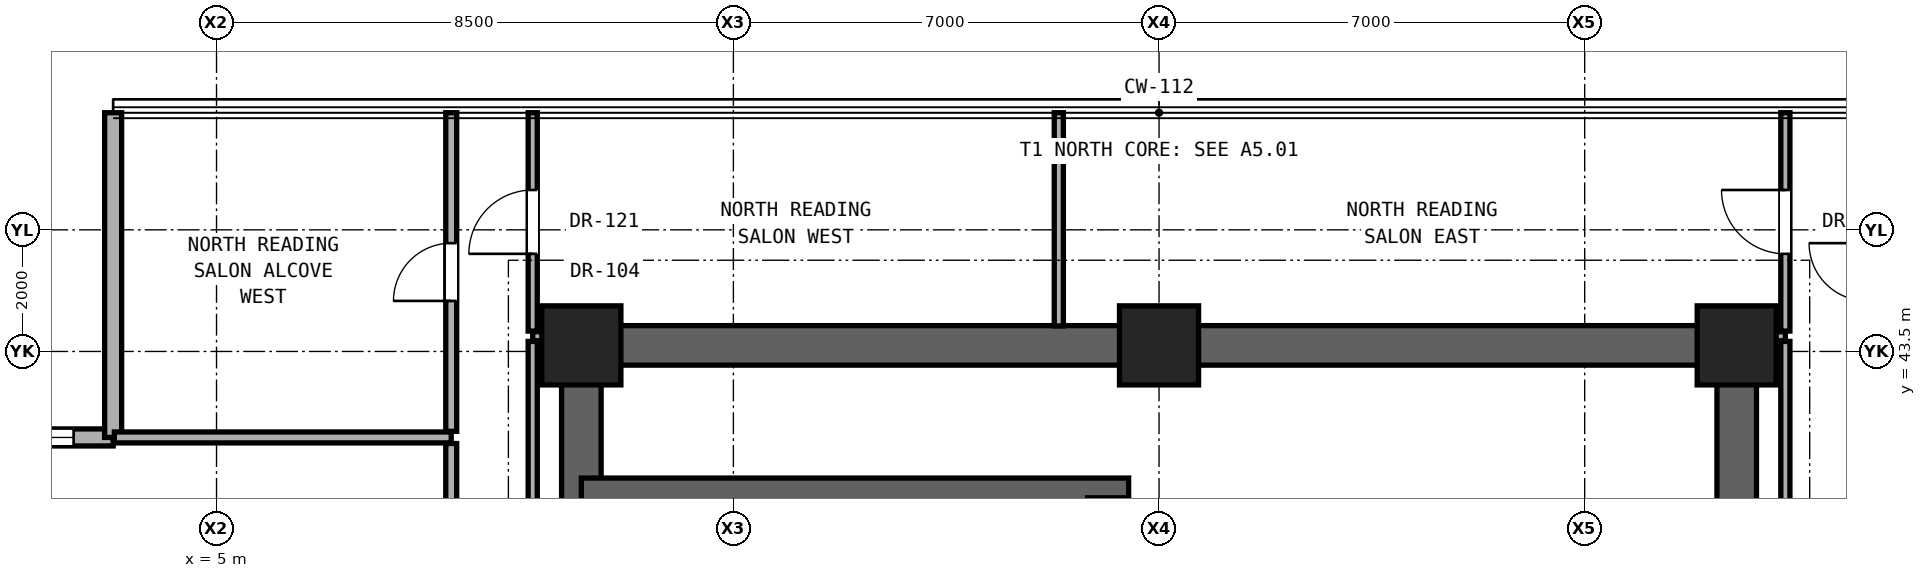
"""IFC4 building model, lengths in metres.
Left out: names, types, materials, properties, quantities, classifications, styles, units other than length and angle.
Written with IfcOpenShell. Run it as: python <this file> out.ifc"""

import sys

from ifc_helpers import new_model, si_unit, direction, frame, frame_2d, origin, origin_2d, place, context, subcontext, project, spatial, rectangle, extrude, element, fill, save


model = new_model("IFC4")
c1 = context("Model", 3, precision=1e-05, world=origin(), true_north=direction((0.0, 1.0)))
c2 = subcontext(c1, "Body", "Model", "MODEL_VIEW")
j1 = project(units=[si_unit("LENGTHUNIT", "METRE"), si_unit("PLANEANGLEUNIT", "RADIAN")], contexts=[c1])
p1 = place(None, origin())
s1 = spatial("IfcSite", under=j1, at=p1, CompositionType="ELEMENT")
p2 = place(p1, origin())
s2 = spatial("IfcBuilding", under=s1, at=p2, CompositionType="ELEMENT")
p3 = place(p2, frame((0.0, 0.0, 75.2)))
s3 = spatial("IfcBuildingStorey", under=s2, at=p3, CompositionType="ELEMENT", Elevation=75.2)
for number, where, z_axis, x_axis in (
    (1, (11.0, 43.6, 0.0), (0.0, 0.0, 1.0), (1.0, 0.0, 0.0)),
    (2, (20.5, 43.6, 0.0), (0.0, 0.0, 1.0), (1.0, 0.0, 0.0)),
    (3, (30.0, 43.6, 0.0), (0.0, 0.0, 1.0), (1.0, 0.0, 0.0)),
):
    element("IfcColumn", number, at=place(p3, frame(where, z_axis=z_axis, x_axis=x_axis)), inside=s3, PredefinedType="COLUMN", context=c2, shape_type="SweptSolid", body=[
        extrude(rectangle(XDim=1.3, YDim=1.3, at=origin_2d()), origin(), (0.0, 0.0, 1.0), 3.3),
    ])
p4 = place(p3, frame((11.0, 43.6, 0.0), z_axis=(0.0, 0.0, 1.0), x_axis=(1.0, 0.0, 0.0)))
e4 = element("IfcWall", 4, at=p4, inside=s3, PredefinedType="SHEAR", context=c2, shape_type="SweptSolid", body=[
    extrude(rectangle(XDim=19.0, YDim=0.65, at=frame_2d((9.5, 0.0))), origin(), (0.0, 0.0, 1.0), 3.06),
])
for number, where, z_axis, x_axis in (
    (5, (11.0, 37.6, 0.0), (0.0, 0.0, 1.0), (0.0, 1.0, 0.0)),
    (6, (30.0, 37.6, 0.0), (0.0, 0.0, 1.0), (0.0, 1.0, 0.0)),
):
    element("IfcWall", number, at=place(p3, frame(where, z_axis=z_axis, x_axis=x_axis)), inside=s3, PredefinedType="SHEAR", context=c2, shape_type="SweptSolid", body=[
        extrude(rectangle(XDim=6.0, YDim=0.65, at=frame_2d((3.0, 0.0))), origin(), (0.0, 0.0, 1.0), 3.06),
    ])
p5 = place(p3, frame((11.0, 41.093, 0.0), z_axis=(0.0, 0.0, 1.0), x_axis=(1.0, 0.0, 0.0)))
e7 = element("IfcWall", 7, at=p5, inside=s3, PredefinedType="SHEAR", context=c2, shape_type="SweptSolid", body=[
    extrude(rectangle(XDim=9.0, YDim=0.65, at=frame_2d((4.5, 0.0))), origin(), (0.0, 0.0, 1.0), 3.06),
])
p6 = place(p3, frame((19.65, 37.6, 0.0), z_axis=(0.0, 0.0, 1.0), x_axis=(0.0, 1.0, 0.0)))
e8 = element("IfcWall", 8, at=p6, inside=s3, PredefinedType="SHEAR", context=c2, shape_type="SweptSolid", body=[
    extrude(rectangle(XDim=3.493, YDim=0.65, at=frame_2d((1.747, 0.0))), origin(), (0.0, 0.0, 1.0), 3.06),
])
p7 = place(p3, frame((3.3, 42.086, 0.0), z_axis=(0.0, 0.0, 1.0), x_axis=(-1.0, 0.0, 0.0)))
e9 = element("IfcWall", 9, at=p7, inside=s3, PredefinedType="SOLIDWALL", context=c2, shape_type="SweptSolid", body=[
    extrude(rectangle(XDim=5.34, YDim=0.28, at=frame_2d((2.67, 0.0))), origin(), (0.0, 0.0, 1.0), 3.04),
])
p8 = place(p7, frame((0.65, 0.0, 0.85)))
e10 = element("IfcOpeningElement", 10, at=p8, cuts=e9, PredefinedType="OPENING", context=c2, shape_type="SweptSolid", body=[
    extrude(rectangle(XDim=1.1, YDim=2.0, at=frame_2d((0.55, 1.0))), frame((0.0, 0.15, 0.0), z_axis=(0.0, -1.0, 0.0), x_axis=(1.0, 0.0, 0.0)), (0.0, 0.0, 1.0), 0.3),
])
p9 = place(p3, frame((3.3, 47.426, 0.0), z_axis=(0.0, 0.0, 1.0), x_axis=(0.0, -1.0, 0.0)))
e11 = element("IfcWall", 11, at=p9, inside=s3, PredefinedType="SOLIDWALL", context=c2, shape_type="SweptSolid", body=[
    extrude(rectangle(XDim=5.34, YDim=0.28, at=frame_2d((2.67, 0.0))), origin(), (0.0, 0.0, 1.0), 3.04),
])
p10 = place(p3, frame((3.32, 42.086, 0.0), z_axis=(0.0, 0.0, 1.0), x_axis=(1.0, 0.0, 0.0)))
e12 = element("IfcWall", 12, at=p10, inside=s3, PredefinedType="PARTITIONING", context=c2, shape_type="SweptSolid", body=[
    extrude(rectangle(XDim=5.54, YDim=0.18, at=frame_2d((2.77, 0.0))), origin(), (0.0, 0.0, 1.0), 3.06),
])
for number, where, z_axis, x_axis in (
    (13, (10.2, 43.75, 0.0), (0.0, 0.0, 1.0), (1.0, 0.0, 0.0)),
    (14, (30.32, 43.75, 0.0), (0.0, 0.0, 1.0), (1.0, 0.0, 0.0)),
):
    element("IfcWall", number, at=place(p3, frame(where, z_axis=z_axis, x_axis=x_axis)), inside=s3, PredefinedType="PARTITIONING", context=c2, shape_type="SweptSolid", body=[
        extrude(rectangle(XDim=0.48, YDim=0.15, at=frame_2d((0.24, 0.0))), origin(), (0.0, 0.0, 1.0), 3.06),
    ])
p11 = place(p3, frame((8.86, 32.211, 0.0), z_axis=(0.0, 0.0, 1.0), x_axis=(0.0, 1.0, 0.0)))
e15 = element("IfcWall", 15, at=p11, inside=s3, PredefinedType="PARTITIONING", context=c2, shape_type="SweptSolid", body=[
    extrude(rectangle(XDim=9.775, YDim=0.18, at=frame_2d((4.888, 0.0))), origin(), (0.0, 0.0, 1.0), 2.436),
])
p12 = place(p11, frame((4.363, 0.0, 0.0)))
e16 = element("IfcOpeningElement", 16, at=p12, cuts=e15, PredefinedType="OPENING", context=c2, shape_type="SweptSolid", body=[
    extrude(rectangle(XDim=1.05, YDim=2.2, at=frame_2d((0.525, 1.1))), frame((0.0, 0.1, 0.0), z_axis=(0.0, -1.0, 0.0), x_axis=(1.0, 0.0, 0.0)), (0.0, 0.0, 1.0), 0.2),
])
p13 = place(p3, frame((8.86, 42.186, 0.0), z_axis=(0.0, 0.0, 1.0), x_axis=(0.0, 1.0, 0.0)))
e17 = element("IfcWall", 17, at=p13, inside=s3, PredefinedType="PARTITIONING", context=c2, shape_type="SweptSolid", body=[
    extrude(rectangle(XDim=5.24, YDim=0.18, at=frame_2d((2.62, 0.0))), origin(), (0.0, 0.0, 1.0), 3.06),
])
p14 = place(p13, frame((2.145, 0.0, 0.0)))
e18 = element("IfcOpeningElement", 18, at=p14, cuts=e17, PredefinedType="OPENING", context=c2, shape_type="SweptSolid", body=[
    extrude(rectangle(XDim=0.95, YDim=2.15, at=frame_2d((0.475, 1.075))), frame((0.0, 0.1, 0.0), z_axis=(0.0, -1.0, 0.0), x_axis=(1.0, 0.0, 0.0)), (0.0, 0.0, 1.0), 0.2),
])
p15 = place(p3, frame((10.2, 34.535, 0.0), z_axis=(0.0, 0.0, 1.0), x_axis=(0.0, 1.0, 0.0)))
e19 = element("IfcWall", 19, at=p15, inside=s3, PredefinedType="PARTITIONING", context=c2, shape_type="SweptSolid", body=[
    extrude(rectangle(XDim=9.13, YDim=0.15, at=frame_2d((4.565, 0.0))), origin(), (0.0, 0.0, 1.0), 2.436),
])
p16 = place(p3, frame((10.2, 43.835, 0.0), z_axis=(0.0, 0.0, 1.0), x_axis=(0.0, 1.0, 0.0)))
e20 = element("IfcWall", 20, at=p16, inside=s3, PredefinedType="PARTITIONING", context=c2, shape_type="SweptSolid", body=[
    extrude(rectangle(XDim=3.591, YDim=0.15, at=frame_2d((1.795, 0.0))), origin(), (0.0, 0.0, 1.0), 3.06),
])
p17 = place(p16, frame((1.271, 0.0, 0.0)))
e21 = element("IfcOpeningElement", 21, at=p17, cuts=e20, PredefinedType="OPENING", context=c2, shape_type="SweptSolid", body=[
    extrude(rectangle(XDim=1.05, YDim=2.2, at=frame_2d((0.525, 1.1))), frame((0.0, 0.085, 0.0), z_axis=(0.0, -1.0, 0.0), x_axis=(1.0, 0.0, 0.0)), (0.0, 0.0, 1.0), 0.17),
])
p18 = place(p3, frame((18.852, 43.92, 0.0), z_axis=(0.0, 0.0, 1.0), x_axis=(0.0, 1.0, 0.0)))
e22 = element("IfcWall", 22, at=p18, inside=s3, PredefinedType="PARTITIONING", context=c2, shape_type="SweptSolid", body=[
    extrude(rectangle(XDim=3.506, YDim=0.15, at=frame_2d((1.753, 0.0))), origin(), (0.0, 0.0, 1.0), 3.06),
])
p19 = place(p3, frame((30.8, 34.57, 0.0), z_axis=(0.0, 0.0, 1.0), x_axis=(0.0, 1.0, 0.0)))
e23 = element("IfcWall", 23, at=p19, inside=s3, PredefinedType="PARTITIONING", context=c2, shape_type="SweptSolid", body=[
    extrude(rectangle(XDim=9.095, YDim=0.15, at=frame_2d((4.547, 0.0))), origin(), (0.0, 0.0, 1.0), 2.436),
])
p20 = place(p3, frame((30.8, 43.835, 0.0), z_axis=(0.0, 0.0, 1.0), x_axis=(0.0, 1.0, 0.0)))
e24 = element("IfcWall", 24, at=p20, inside=s3, PredefinedType="PARTITIONING", context=c2, shape_type="SweptSolid", body=[
    extrude(rectangle(XDim=3.591, YDim=0.15, at=frame_2d((1.795, 0.0))), origin(), (0.0, 0.0, 1.0), 3.06),
])
p21 = place(p20, frame((1.271, 0.0, 0.0)))
e25 = element("IfcOpeningElement", 25, at=p21, cuts=e24, PredefinedType="OPENING", context=c2, shape_type="SweptSolid", body=[
    extrude(rectangle(XDim=1.05, YDim=2.2, at=frame_2d((0.525, 1.1))), frame((0.0, 0.085, 0.0), z_axis=(0.0, -1.0, 0.0), x_axis=(1.0, 0.0, 0.0)), (0.0, 0.0, 1.0), 0.17),
])
p22 = place(p8, origin())
e26 = element("IfcWindow", 26, at=p22, inside=s3, PartitioningType="SINGLE_PANEL", PredefinedType="WINDOW", context=c2, shape_type="SweptSolid", body=[
    extrude(rectangle(XDim=1.1, YDim=2.0, at=frame_2d((0.55, 1.0))), frame((0.0, 0.03, 0.0), z_axis=(0.0, -1.0, 0.0), x_axis=(1.0, 0.0, 0.0)), (0.0, 0.0, 1.0), 0.06),
])
fill(e10, e26)
p23 = place(p17, origin())
e27 = element("IfcDoor", 27, at=p23, inside=s3, OperationType="SINGLE_SWING_LEFT", PredefinedType="DOOR", context=c2, shape_type="SweptSolid", body=[
    extrude(rectangle(XDim=1.05, YDim=2.2, at=frame_2d((0.525, 1.1))), frame((0.0, 0.025, 0.0), z_axis=(0.0, -1.0, 0.0), x_axis=(1.0, 0.0, 0.0)), (0.0, 0.0, 1.0), 0.05),
])
fill(e21, e27)
p24 = place(p21, origin())
e28 = element("IfcDoor", 28, at=p24, inside=s3, OperationType="SINGLE_SWING_RIGHT", PredefinedType="DOOR", context=c2, shape_type="SweptSolid", body=[
    extrude(rectangle(XDim=1.05, YDim=2.2, at=frame_2d((0.525, 1.1))), frame((0.0, 0.025, 0.0), z_axis=(0.0, -1.0, 0.0), x_axis=(1.0, 0.0, 0.0)), (0.0, 0.0, 1.0), 0.05),
])
fill(e25, e28)
p25 = place(p14, origin())
e29 = element("IfcDoor", 29, at=p25, inside=s3, OperationType="SINGLE_SWING_LEFT", PredefinedType="DOOR", context=c2, shape_type="SweptSolid", body=[
    extrude(rectangle(XDim=0.95, YDim=2.15, at=frame_2d((0.475, 1.075))), frame((0.0, 0.025, 0.0), z_axis=(0.0, -1.0, 0.0), x_axis=(1.0, 0.0, 0.0)), (0.0, 0.0, 1.0), 0.05),
])
fill(e18, e29)
save(model, sys.argv[1])
